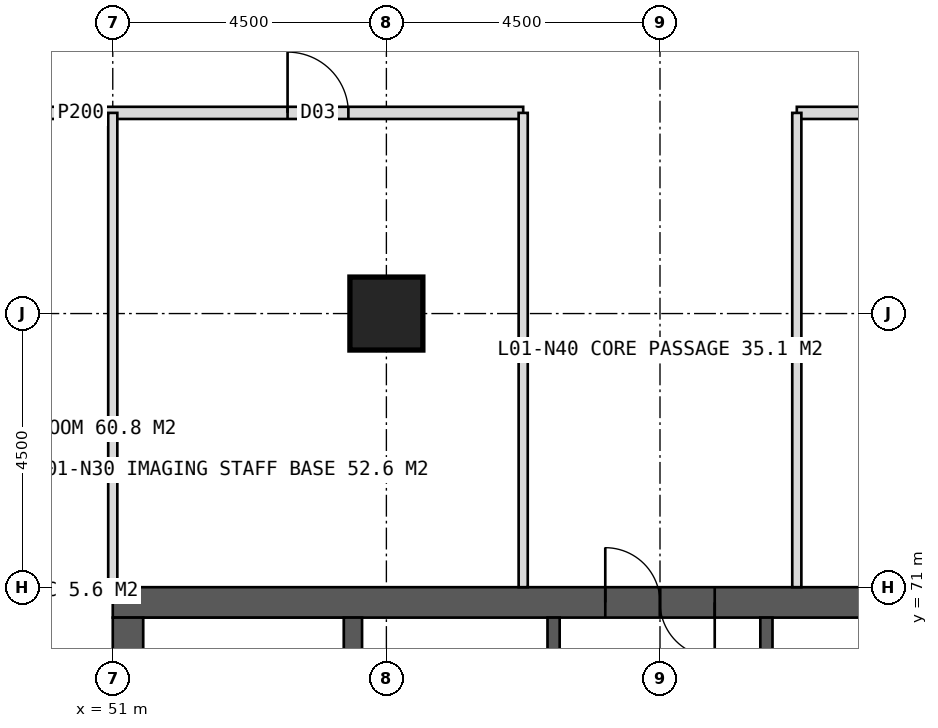
"""IFC4 building model, lengths in metres.
Left out: names, types, materials, properties, quantities, classifications, styles, units other than length and angle.
Written with IfcOpenShell. Run it as: python <this file> out.ifc"""

import sys

from ifc_helpers import new_model, si_unit, direction, frame, frame_2d, origin, origin_2d, place, context, subcontext, project, spatial, rectangle, hollow_rectangle, extrude, element, fill, save


model = new_model("IFC4")
c1 = context("Model", 3, precision=1e-05, world=origin(), true_north=direction((0.0, 1.0)))
c2 = subcontext(c1, "Body", "Model", "MODEL_VIEW")
j1 = project(units=[si_unit("LENGTHUNIT", "METRE"), si_unit("PLANEANGLEUNIT", "RADIAN")], contexts=[c1])
p1 = place(None, origin())
s1 = spatial("IfcSite", under=j1, at=p1, CompositionType="ELEMENT")
p2 = place(p1, origin())
s2 = spatial("IfcBuilding", under=s1, at=p2, CompositionType="ELEMENT")
p3 = place(p2, frame((0.0, 0.0, 6.0)))
s3 = spatial("IfcBuildingStorey", under=s2, at=p3, CompositionType="ELEMENT", Elevation=6.0)
p4 = place(p3, frame((51.0, 70.75, 0.0), z_axis=(0.0, 0.0, 1.0), x_axis=(1.0, 0.0, 0.0)))
e1 = element("IfcWall", 1, at=p4, inside=s3, PredefinedType="SHEAR", context=c2, shape_type="SweptSolid", body=[
    extrude(rectangle(XDim=18.0, YDim=0.5, at=frame_2d((9.0, 0.0))), origin(), (0.0, 0.0, 1.0), 5.0),
])
p5 = place(p4, frame((8.1, 0.0, 0.0)))
e2 = element("IfcOpeningElement", 2, at=p5, cuts=e1, PredefinedType="OPENING", context=c2, shape_type="SweptSolid", body=[
    extrude(rectangle(XDim=1.8, YDim=2.2, at=frame_2d((0.9, 1.1))), frame((0.0, 0.26, 0.0), z_axis=(0.0, -1.0, 0.0), x_axis=(1.0, 0.0, 0.0)), (0.0, 0.0, 1.0), 0.52),
])
p6 = place(p3, frame((51.25, 53.5, 0.0), z_axis=(0.0, 0.0, 1.0), x_axis=(0.0, 1.0, 0.0)))
e3 = element("IfcWall", 3, at=p6, inside=s3, PredefinedType="SHEAR", context=c2, shape_type="SweptSolid", body=[
    extrude(rectangle(XDim=17.0, YDim=0.5, at=frame_2d((8.5, 0.0))), origin(), (0.0, 0.0, 1.0), 5.0),
])
p7 = place(p6, frame((6.0, 0.0, 0.0)))
e4 = element("IfcOpeningElement", 4, at=p7, cuts=e3, PredefinedType="OPENING", context=c2, shape_type="SweptSolid", body=[
    extrude(rectangle(XDim=1.5, YDim=2.2, at=frame_2d((0.75, 1.1))), frame((0.0, 0.26, 0.0), z_axis=(0.0, -1.0, 0.0), x_axis=(1.0, 0.0, 0.0)), (0.0, 0.0, 1.0), 0.52),
])
p8 = place(p3, frame((54.95, 53.5, 0.0), z_axis=(0.0, 0.0, 1.0), x_axis=(0.0, 1.0, 0.0)))
e5 = element("IfcWall", 5, at=p8, inside=s3, PredefinedType="SHEAR", context=c2, shape_type="SweptSolid", body=[
    extrude(rectangle(XDim=17.0, YDim=0.3, at=frame_2d((8.5, 0.0))), origin(), (0.0, 0.0, 1.0), 5.0),
])
p9 = place(p3, frame((58.25, 53.5, 0.0), z_axis=(0.0, 0.0, 1.0), x_axis=(0.0, 1.0, 0.0)))
e6 = element("IfcWall", 6, at=p9, inside=s3, PredefinedType="SHEAR", context=c2, shape_type="SweptSolid", body=[
    extrude(rectangle(XDim=17.0, YDim=0.2, at=frame_2d((8.5, 0.0))), origin(), (0.0, 0.0, 1.0), 5.0),
])
p10 = place(p9, frame((1.375, 0.0, 0.0)))
e7 = element("IfcOpeningElement", 7, at=p10, cuts=e6, PredefinedType="OPENING", context=c2, shape_type="SweptSolid", body=[
    extrude(rectangle(XDim=1.4, YDim=2.2, at=frame_2d((0.7, 1.1))), frame((0.0, 0.11, 0.0), z_axis=(0.0, -1.0, 0.0), x_axis=(1.0, 0.0, 0.0)), (0.0, 0.0, 1.0), 0.22),
])
p11 = place(p9, frame((5.675, 0.0, 0.0)))
e8 = element("IfcOpeningElement", 8, at=p11, cuts=e6, PredefinedType="OPENING", context=c2, shape_type="SweptSolid", body=[
    extrude(rectangle(XDim=1.4, YDim=2.2, at=frame_2d((0.7, 1.1))), frame((0.0, 0.11, 0.0), z_axis=(0.0, -1.0, 0.0), x_axis=(1.0, 0.0, 0.0)), (0.0, 0.0, 1.0), 0.22),
])
p12 = place(p3, frame((61.75, 53.5, 0.0), z_axis=(0.0, 0.0, 1.0), x_axis=(0.0, 1.0, 0.0)))
e9 = element("IfcWall", 9, at=p12, inside=s3, PredefinedType="SHEAR", context=c2, shape_type="SweptSolid", body=[
    extrude(rectangle(XDim=17.0, YDim=0.2, at=frame_2d((8.5, 0.0))), origin(), (0.0, 0.0, 1.0), 5.0),
])
p13 = place(p12, frame((1.375, 0.0, 0.0)))
e10 = element("IfcOpeningElement", 10, at=p13, cuts=e9, PredefinedType="OPENING", context=c2, shape_type="SweptSolid", body=[
    extrude(rectangle(XDim=1.4, YDim=2.2, at=frame_2d((0.7, 1.1))), frame((0.0, 0.11, 0.0), z_axis=(0.0, -1.0, 0.0), x_axis=(1.0, 0.0, 0.0)), (0.0, 0.0, 1.0), 0.22),
])
p14 = place(p12, frame((5.675, 0.0, 0.0)))
e11 = element("IfcOpeningElement", 11, at=p14, cuts=e9, PredefinedType="OPENING", context=c2, shape_type="SweptSolid", body=[
    extrude(rectangle(XDim=1.4, YDim=2.2, at=frame_2d((0.7, 1.1))), frame((0.0, 0.11, 0.0), z_axis=(0.0, -1.0, 0.0), x_axis=(1.0, 0.0, 0.0)), (0.0, 0.0, 1.0), 0.22),
])
p15 = place(p3, frame((55.5, 75.5, 0.0), z_axis=(0.0, 0.0, 1.0), x_axis=(1.0, 0.0, 0.0)))
e12 = element("IfcColumn", 12, at=p15, inside=s3, PredefinedType="COLUMN", context=c2, shape_type="SweptSolid", body=[
    extrude(hollow_rectangle(XDim=1.2, YDim=1.2, WallThickness=0.1, at=origin_2d()), origin(), (0.0, 0.0, 1.0), 5.0),
])
p16 = place(p3, frame((43.2, 78.8, 0.0), z_axis=(0.0, 0.0, 1.0), x_axis=(1.0, 0.0, 0.0)))
e13 = element("IfcWall", 13, at=p16, inside=s3, PredefinedType="PARTITIONING", context=c2, shape_type="SweptSolid", body=[
    extrude(rectangle(XDim=14.55, YDim=0.2, at=frame_2d((7.275, 0.0))), origin(), (0.0, 0.0, 1.0), 4.7),
])
p17 = place(p16, frame((10.675, 0.0, 0.0)))
e14 = element("IfcOpeningElement", 14, at=p17, cuts=e13, PredefinedType="OPENING", context=c2, shape_type="SweptSolid", body=[
    extrude(rectangle(XDim=1.0, YDim=2.1, at=frame_2d((0.5, 1.05))), frame((0.0, 0.11, 0.0), z_axis=(0.0, -1.0, 0.0), x_axis=(1.0, 0.0, 0.0)), (0.0, 0.0, 1.0), 0.22),
])
p18 = place(p3, frame((62.25, 78.8, 0.0), z_axis=(0.0, 0.0, 1.0), x_axis=(1.0, 0.0, 0.0)))
e15 = element("IfcWall", 15, at=p18, inside=s3, PredefinedType="PARTITIONING", context=c2, shape_type="SweptSolid", body=[
    extrude(rectangle(XDim=6.75, YDim=0.2, at=frame_2d((3.375, 0.0))), origin(), (0.0, 0.0, 1.0), 4.7),
])
p19 = place(p18, frame((2.875, 0.0, 0.0)))
e16 = element("IfcOpeningElement", 16, at=p19, cuts=e15, PredefinedType="OPENING", context=c2, shape_type="SweptSolid", body=[
    extrude(rectangle(XDim=1.0, YDim=2.1, at=frame_2d((0.5, 1.05))), frame((0.0, 0.11, 0.0), z_axis=(0.0, -1.0, 0.0), x_axis=(1.0, 0.0, 0.0)), (0.0, 0.0, 1.0), 0.22),
])
for number, where, z_axis, x_axis in (
    (17, (51.0, 71.0, 0.0), (0.0, 0.0, 1.0), (0.0, 1.0, 0.0)),
    (18, (57.75, 71.0, 0.0), (0.0, 0.0, 1.0), (0.0, 1.0, 0.0)),
    (19, (62.25, 71.0, 0.0), (0.0, 0.0, 1.0), (0.0, 1.0, 0.0)),
    (20, (51.0, 71.0, 0.0), (0.0, 0.0, 1.0), (-1.0, 0.0, 0.0)),
):
    element("IfcWall", number, at=place(p3, frame(where, z_axis=z_axis, x_axis=x_axis)), inside=s3, PredefinedType="PARTITIONING", context=c2, shape_type="SweptSolid", body=[
        extrude(rectangle(XDim=7.8, YDim=0.15, at=frame_2d((3.9, 0.0))), origin(), (0.0, 0.0, 1.0), 4.7),
    ])
p20 = place(p17, origin())
e21 = element("IfcDoor", 21, at=p20, inside=s3, OperationType="SINGLE_SWING_LEFT", PredefinedType="DOOR", context=c2, shape_type="SweptSolid", body=[
    extrude(rectangle(XDim=1.0, YDim=2.1, at=frame_2d((0.5, 1.05))), frame((0.0, 0.025, 0.0), z_axis=(0.0, -1.0, 0.0), x_axis=(1.0, 0.0, 0.0)), (0.0, 0.0, 1.0), 0.05),
])
fill(e14, e21)
p21 = place(p5, origin())
e22 = element("IfcDoor", 22, at=p21, inside=s3, OperationType="DOUBLE_DOOR_SINGLE_SWING", PredefinedType="DOOR", context=c2, shape_type="SweptSolid", body=[
    extrude(rectangle(XDim=1.8, YDim=2.2, at=frame_2d((0.9, 1.1))), frame((0.0, 0.025, 0.0), z_axis=(0.0, -1.0, 0.0), x_axis=(1.0, 0.0, 0.0)), (0.0, 0.0, 1.0), 0.05),
])
fill(e2, e22)
save(model, sys.argv[1])
